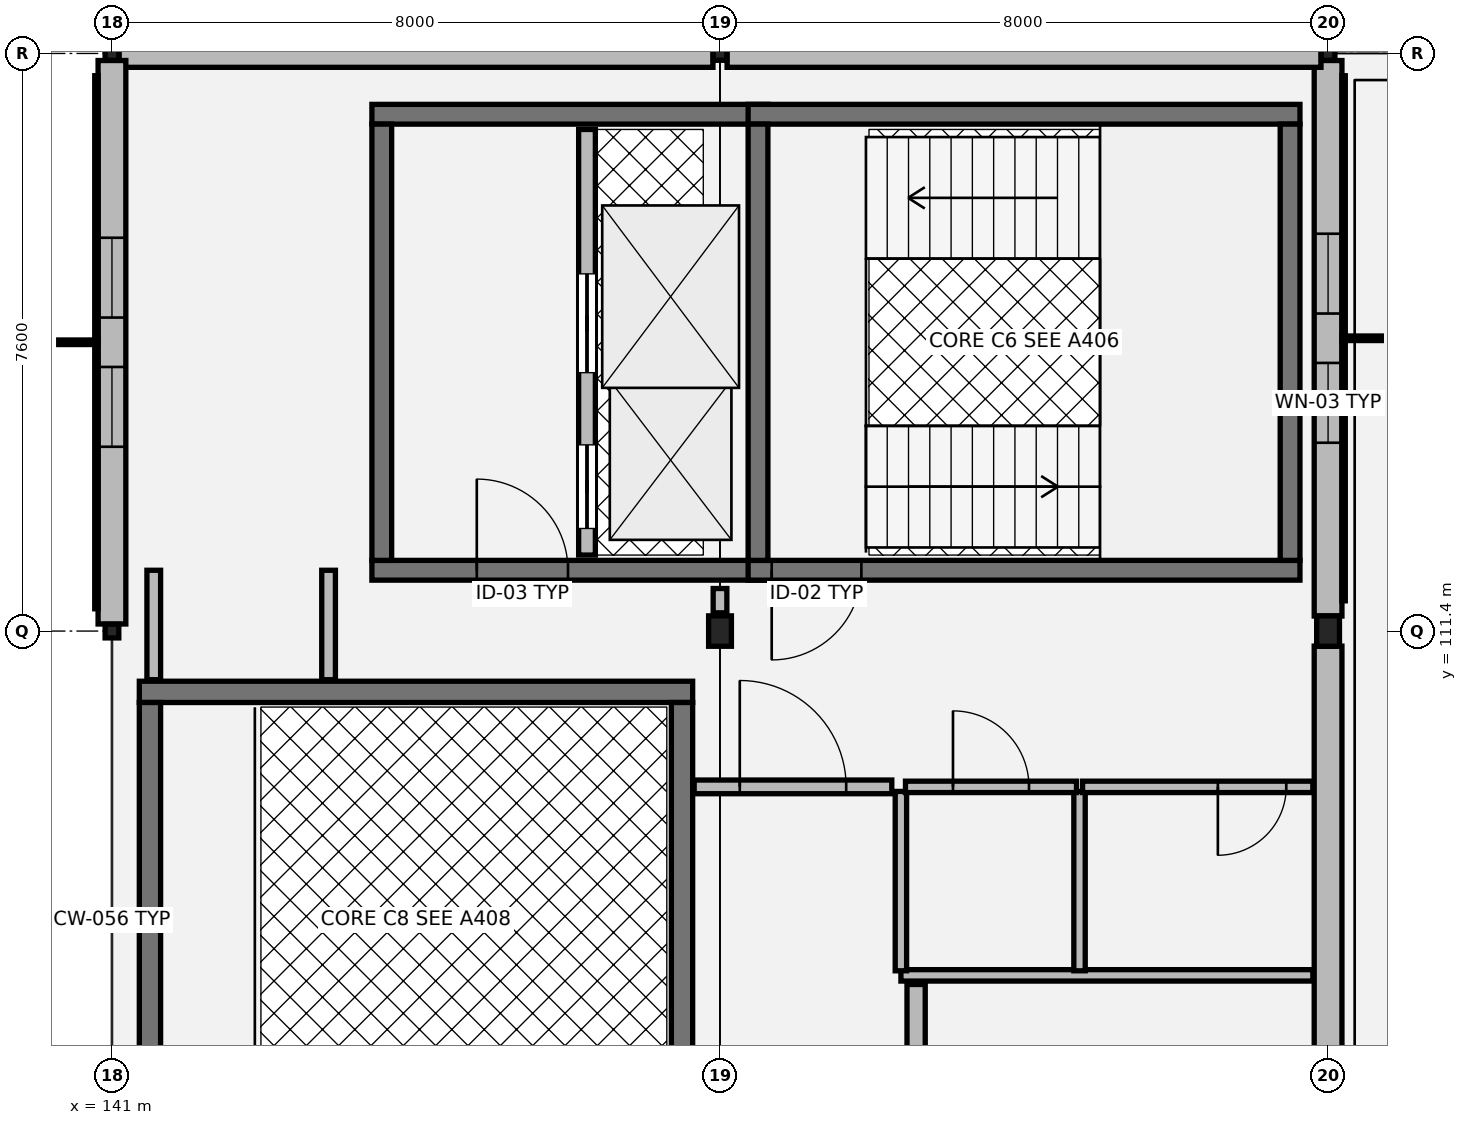
"""IFC4 building model, lengths in metres.
Left out: names, types, materials, properties, quantities, classifications, styles, units other than length and angle.
Written with IfcOpenShell. Run it as: python <this file> out.ifc"""

import sys

from ifc_helpers import new_model, si_unit, direction, frame, frame_2d, origin, origin_2d, place, context, subcontext, project, spatial, rectangle, hollow_rectangle, i_section, extrude, element, fill, save


model = new_model("IFC4")
c1 = context("Model", 3, precision=1e-05, world=origin(), true_north=direction((0.0, 1.0)))
c2 = subcontext(c1, "Body", "Model", "MODEL_VIEW")
j1 = project(units=[si_unit("LENGTHUNIT", "METRE"), si_unit("PLANEANGLEUNIT", "RADIAN")], contexts=[c1])
p1 = place(None, origin())
s1 = spatial("IfcSite", under=j1, at=p1, CompositionType="ELEMENT")
p2 = place(p1, origin())
s2 = spatial("IfcBuilding", under=s1, at=p2, CompositionType="ELEMENT")
p3 = place(p2, frame((0.0, 0.0, 17.34)))
s3 = spatial("IfcBuildingStorey", under=s2, at=p3, CompositionType="ELEMENT", Elevation=17.34)
for number, where, z_axis, x_axis in (
    (1, (141.0, 111.4, 0.0), (0.0, 0.0, 1.0), (1.0, 0.0, 0.0)),
    (2, (141.0, 119.0, 0.0), (0.0, 0.0, 1.0), (1.0, 0.0, 0.0)),
):
    element("IfcColumn", number, at=place(p3, frame(where, z_axis=z_axis, x_axis=x_axis)), inside=s3, PredefinedType="COLUMN", context=c2, shape_type="SweptSolid", body=[
        extrude(hollow_rectangle(XDim=0.18, YDim=0.18, WallThickness=0.01, at=origin_2d()), origin(), (0.0, 0.0, 1.0), 4.055),
    ])
p4 = place(p3, frame((149.0, 111.4, 0.0), z_axis=(0.0, 0.0, 1.0), x_axis=(1.0, 0.0, 0.0)))
e3 = element("IfcColumn", 3, at=p4, inside=s3, PredefinedType="COLUMN", context=c2, shape_type="SweptSolid", body=[
    extrude(i_section(OverallWidth=0.3, OverallDepth=0.4, WebThickness=0.013, FlangeThickness=0.024, at=origin_2d()), origin(), (0.0, 0.0, 1.0), 4.055),
])
p5 = place(p3, frame((149.0, 119.0, 0.0), z_axis=(0.0, 0.0, 1.0), x_axis=(1.0, 0.0, 0.0)))
e4 = element("IfcColumn", 4, at=p5, inside=s3, PredefinedType="COLUMN", context=c2, shape_type="SweptSolid", body=[
    extrude(hollow_rectangle(XDim=0.18, YDim=0.18, WallThickness=0.01, at=origin_2d()), origin(), (0.0, 0.0, 1.0), 4.055),
])
p6 = place(p3, frame((157.0, 111.4, 0.0), z_axis=(0.0, 0.0, 1.0), x_axis=(1.0, 0.0, 0.0)))
e5 = element("IfcColumn", 5, at=p6, inside=s3, PredefinedType="COLUMN", context=c2, shape_type="SweptSolid", body=[
    extrude(i_section(OverallWidth=0.3, OverallDepth=0.4, WebThickness=0.013, FlangeThickness=0.024, at=origin_2d()), origin(), (0.0, 0.0, 1.0), 4.055),
])
p7 = place(p3, frame((157.0, 119.0, 0.0), z_axis=(0.0, 0.0, 1.0), x_axis=(1.0, 0.0, 0.0)))
e6 = element("IfcColumn", 6, at=p7, inside=s3, PredefinedType="COLUMN", context=c2, shape_type="SweptSolid", body=[
    extrude(hollow_rectangle(XDim=0.18, YDim=0.18, WallThickness=0.01, at=origin_2d()), origin(), (0.0, 0.0, 1.0), 4.055),
])
p8 = place(p3, frame((157.0, 103.998, 0.0), z_axis=(0.0, 0.0, 1.0), x_axis=(0.0, 1.0, 0.0)))
e7 = element("IfcWall", 7, at=p8, inside=s3, PredefinedType="SOLIDWALL", context=c2, shape_type="SweptSolid", body=[
    extrude(rectangle(XDim=7.204, YDim=0.365, at=frame_2d((3.602, 0.0))), origin(), (0.0, 0.0, 1.0), 3.22),
])
p9 = place(p3, frame((157.0, 111.598, 0.0), z_axis=(0.0, 0.0, 1.0), x_axis=(0.0, 1.0, 0.0)))
e8 = element("IfcWall", 8, at=p9, inside=s3, PredefinedType="SOLIDWALL", context=c2, shape_type="SweptSolid", body=[
    extrude(rectangle(XDim=7.309, YDim=0.365, at=frame_2d((3.655, 0.0))), origin(), (0.0, 0.0, 1.0), 3.22),
])
p10 = place(p9, frame((2.28, 0.0, 0.8)))
e9 = element("IfcOpeningElement", 9, at=p10, cuts=e8, PredefinedType="OPENING", context=c2, shape_type="SweptSolid", body=[
    extrude(rectangle(XDim=1.05, YDim=2.05, at=frame_2d((0.525, 1.025))), frame((0.0, 0.192, 0.0), z_axis=(0.0, -1.0, 0.0), x_axis=(1.0, 0.0, 0.0)), (0.0, 0.0, 1.0), 0.385),
])
p11 = place(p9, frame((3.98, 0.0, 0.8)))
e10 = element("IfcOpeningElement", 10, at=p11, cuts=e8, PredefinedType="OPENING", context=c2, shape_type="SweptSolid", body=[
    extrude(rectangle(XDim=1.05, YDim=2.05, at=frame_2d((0.525, 1.025))), frame((0.0, 0.192, 0.0), z_axis=(0.0, -1.0, 0.0), x_axis=(1.0, 0.0, 0.0)), (0.0, 0.0, 1.0), 0.385),
])
for number, where, z_axis, x_axis in (
    (11, (156.907, 119.0, 0.0), (0.0, 0.0, 1.0), (-1.0, 0.0, 0.0)),
    (12, (148.907, 119.0, 0.0), (0.0, 0.0, 1.0), (-1.0, 0.0, 0.0)),
):
    element("IfcWall", number, at=place(p3, frame(where, z_axis=z_axis, x_axis=x_axis)), inside=s3, PredefinedType="SOLIDWALL", context=c2, shape_type="SweptSolid", body=[
        extrude(rectangle(XDim=7.814, YDim=0.365, at=frame_2d((3.907, 0.0))), origin(), (0.0, 0.0, 1.0), 3.48),
    ])
p12 = place(p3, frame((141.0, 118.907, 0.0), z_axis=(0.0, 0.0, 1.0), x_axis=(0.0, -1.0, 0.0)))
e13 = element("IfcWall", 13, at=p12, inside=s3, PredefinedType="SOLIDWALL", context=c2, shape_type="SweptSolid", body=[
    extrude(rectangle(XDim=7.414, YDim=0.365, at=frame_2d((3.707, 0.0))), origin(), (0.0, 0.0, 1.0), 3.48),
])
p13 = place(p12, frame((2.332, 0.0, 0.8)))
e14 = element("IfcOpeningElement", 14, at=p13, cuts=e13, PredefinedType="OPENING", context=c2, shape_type="SweptSolid", body=[
    extrude(rectangle(XDim=1.05, YDim=2.05, at=frame_2d((0.525, 1.025))), frame((0.0, 0.192, 0.0), z_axis=(0.0, -1.0, 0.0), x_axis=(1.0, 0.0, 0.0)), (0.0, 0.0, 1.0), 0.385),
])
p14 = place(p12, frame((4.032, 0.0, 0.8)))
e15 = element("IfcOpeningElement", 15, at=p14, cuts=e13, PredefinedType="OPENING", context=c2, shape_type="SweptSolid", body=[
    extrude(rectangle(XDim=1.05, YDim=2.05, at=frame_2d((0.525, 1.025))), frame((0.0, 0.192, 0.0), z_axis=(0.0, -1.0, 0.0), x_axis=(1.0, 0.0, 0.0)), (0.0, 0.0, 1.0), 0.385),
])
p15 = place(p3, frame((144.42, 112.2, 0.0), z_axis=(0.0, 0.0, 1.0), x_axis=(1.0, 0.0, 0.0)))
e16 = element("IfcWall", 16, at=p15, inside=s3, PredefinedType="SHEAR", context=c2, shape_type="SweptSolid", body=[
    extrude(rectangle(XDim=5.21, YDim=0.26, at=frame_2d((2.605, 0.0))), origin(), (0.0, 0.0, 1.0), 3.845),
])
p16 = place(p15, frame((1.38, 0.0, 0.0)))
e17 = element("IfcOpeningElement", 17, at=p16, cuts=e16, PredefinedType="OPENING", context=c2, shape_type="SweptSolid", body=[
    extrude(rectangle(XDim=1.2, YDim=2.16, at=frame_2d((0.6, 1.08))), frame((0.0, 0.14, 0.0), z_axis=(0.0, -1.0, 0.0), x_axis=(1.0, 0.0, 0.0)), (0.0, 0.0, 1.0), 0.28),
])
p17 = place(p3, frame((149.63, 118.2, 0.0), z_axis=(0.0, 0.0, 1.0), x_axis=(-1.0, 0.0, 0.0)))
e18 = element("IfcWall", 18, at=p17, inside=s3, PredefinedType="SHEAR", context=c2, shape_type="SweptSolid", body=[
    extrude(rectangle(XDim=5.21, YDim=0.26, at=frame_2d((2.605, 0.0))), origin(), (0.0, 0.0, 1.0), 3.845),
])
p18 = place(p3, frame((144.55, 118.07, 0.0), z_axis=(0.0, 0.0, 1.0), x_axis=(0.0, -1.0, 0.0)))
e19 = element("IfcWall", 19, at=p18, inside=s3, PredefinedType="SHEAR", context=c2, shape_type="SweptSolid", body=[
    extrude(rectangle(XDim=5.74, YDim=0.26, at=frame_2d((2.87, 0.0))), origin(), (0.0, 0.0, 1.0), 3.845),
])
p19 = place(p3, frame((147.25, 112.4, 0.0), z_axis=(0.0, 0.0, 1.0), x_axis=(0.0, 1.0, 0.0)))
e20 = element("IfcWall", 20, at=p19, inside=s3, PredefinedType="SOLIDWALL", context=c2, shape_type="SweptSolid", body=[
    extrude(rectangle(XDim=5.6, YDim=0.22, at=frame_2d((2.8, 0.0))), origin(), (0.0, 0.0, 1.0), 3.845),
])
p20 = place(p19, frame((0.35, 0.0, 0.0)))
e21 = element("IfcOpeningElement", 21, at=p20, cuts=e20, PredefinedType="OPENING", context=c2, shape_type="SweptSolid", body=[
    extrude(rectangle(XDim=1.1, YDim=2.15, at=frame_2d((0.55, 1.075))), frame((0.0, 0.12, 0.0), z_axis=(0.0, -1.0, 0.0), x_axis=(1.0, 0.0, 0.0)), (0.0, 0.0, 1.0), 0.24),
])
p21 = place(p19, frame((2.4, 0.0, 0.0)))
e22 = element("IfcOpeningElement", 22, at=p21, cuts=e20, PredefinedType="OPENING", context=c2, shape_type="SweptSolid", body=[
    extrude(rectangle(XDim=1.3, YDim=2.18, at=frame_2d((0.65, 1.09))), frame((0.0, 0.12, 0.0), z_axis=(0.0, -1.0, 0.0), x_axis=(1.0, 0.0, 0.0)), (0.0, 0.0, 1.0), 0.24),
])
p22 = place(p3, frame((149.37, 112.2, 0.0), z_axis=(0.0, 0.0, 1.0), x_axis=(1.0, 0.0, 0.0)))
e23 = element("IfcWall", 23, at=p22, inside=s3, PredefinedType="SHEAR", context=c2, shape_type="SweptSolid", body=[
    extrude(rectangle(XDim=7.26, YDim=0.26, at=frame_2d((3.63, 0.0))), origin(), (0.0, 0.0, 1.0), 3.845),
])
p23 = place(p22, frame((0.31, 0.0, 0.0)))
e24 = element("IfcOpeningElement", 24, at=p23, cuts=e23, PredefinedType="OPENING", context=c2, shape_type="SweptSolid", body=[
    extrude(rectangle(XDim=1.18, YDim=2.18, at=frame_2d((0.59, 1.09))), frame((0.0, 0.14, 0.0), z_axis=(0.0, -1.0, 0.0), x_axis=(1.0, 0.0, 0.0)), (0.0, 0.0, 1.0), 0.28),
])
p24 = place(p3, frame((149.37, 118.2, 0.0), z_axis=(0.0, 0.0, 1.0), x_axis=(1.0, 0.0, 0.0)))
e25 = element("IfcWall", 25, at=p24, inside=s3, PredefinedType="SHEAR", context=c2, shape_type="SweptSolid", body=[
    extrude(rectangle(XDim=7.26, YDim=0.26, at=frame_2d((3.63, 0.0))), origin(), (0.0, 0.0, 1.0), 3.845),
])
for number, where, z_axis, x_axis in (
    (26, (149.5, 112.33, 0.0), (0.0, 0.0, 1.0), (0.0, 1.0, 0.0)),
    (27, (156.5, 112.33, 0.0), (0.0, 0.0, 1.0), (0.0, 1.0, 0.0)),
):
    element("IfcWall", number, at=place(p3, frame(where, z_axis=z_axis, x_axis=x_axis)), inside=s3, PredefinedType="SHEAR", context=c2, shape_type="SweptSolid", body=[
        extrude(rectangle(XDim=5.74, YDim=0.26, at=frame_2d((2.87, 0.0))), origin(), (0.0, 0.0, 1.0), 3.845),
    ])
p25 = place(p3, frame((141.36, 110.6, 0.0), z_axis=(0.0, 0.0, 1.0), x_axis=(1.0, 0.0, 0.0)))
e28 = element("IfcWall", 28, at=p25, inside=s3, PredefinedType="SHEAR", context=c2, shape_type="SweptSolid", body=[
    extrude(rectangle(XDim=7.28, YDim=0.28, at=frame_2d((3.64, 0.0))), origin(), (0.0, 0.0, 1.0), 3.845),
])
for number, where, z_axis, x_axis in (
    (29, (141.5, 104.74, 0.0), (0.0, 0.0, 1.0), (0.0, 1.0, 0.0)),
    (30, (148.5, 104.74, 0.0), (0.0, 0.0, 1.0), (0.0, 1.0, 0.0)),
):
    element("IfcWall", number, at=place(p3, frame(where, z_axis=z_axis, x_axis=x_axis)), inside=s3, PredefinedType="SHEAR", context=c2, shape_type="SweptSolid", body=[
        extrude(rectangle(XDim=5.72, YDim=0.28, at=frame_2d((2.86, 0.0))), origin(), (0.0, 0.0, 1.0), 3.845),
    ])
p26 = place(p3, frame((151.38, 106.87, 0.0), z_axis=(0.0, 0.0, 1.0), x_axis=(1.0, 0.0, 0.0)))
e31 = element("IfcWall", 31, at=p26, inside=s3, PredefinedType="PARTITIONING", context=c2, shape_type="SweptSolid", body=[
    extrude(rectangle(XDim=5.42, YDim=0.15, at=frame_2d((2.71, 0.0))), origin(), (0.0, 0.0, 1.0), 3.18),
])
for number, where, z_axis, x_axis in (
    (32, (151.38, 106.93, 0.0), (0.0, 0.0, 1.0), (0.0, 1.0, 0.0)),
    (33, (153.73, 106.93, 0.0), (0.0, 0.0, 1.0), (0.0, 1.0, 0.0)),
):
    element("IfcWall", number, at=place(p3, frame(where, z_axis=z_axis, x_axis=x_axis)), inside=s3, PredefinedType="PARTITIONING", context=c2, shape_type="SweptSolid", body=[
        extrude(rectangle(XDim=2.36, YDim=0.15, at=frame_2d((1.18, 0.0))), origin(), (0.0, 0.0, 1.0), 3.18),
    ])
p27 = place(p3, frame((151.44, 109.35, 0.0), z_axis=(0.0, 0.0, 1.0), x_axis=(1.0, 0.0, 0.0)))
e34 = element("IfcWall", 34, at=p27, inside=s3, PredefinedType="PARTITIONING", context=c2, shape_type="SweptSolid", body=[
    extrude(rectangle(XDim=2.25, YDim=0.15, at=frame_2d((1.125, 0.0))), origin(), (0.0, 0.0, 1.0), 3.18),
])
p28 = place(p27, frame((0.625, 0.0, 0.0)))
e35 = element("IfcOpeningElement", 35, at=p28, cuts=e34, PredefinedType="OPENING", context=c2, shape_type="SweptSolid", body=[
    extrude(rectangle(XDim=1.0, YDim=2.15, at=frame_2d((0.5, 1.075))), frame((0.0, 0.085, 0.0), z_axis=(0.0, -1.0, 0.0), x_axis=(1.0, 0.0, 0.0)), (0.0, 0.0, 1.0), 0.17),
])
p29 = place(p3, frame((153.77, 109.35, 0.0), z_axis=(0.0, 0.0, 1.0), x_axis=(1.0, 0.0, 0.0)))
e36 = element("IfcWall", 36, at=p29, inside=s3, PredefinedType="PARTITIONING", context=c2, shape_type="SweptSolid", body=[
    extrude(rectangle(XDim=3.03, YDim=0.15, at=frame_2d((1.515, 0.0))), origin(), (0.0, 0.0, 1.0), 3.18),
])
p30 = place(p29, frame((1.78, 0.0, 0.0)))
e37 = element("IfcOpeningElement", 37, at=p30, cuts=e36, PredefinedType="OPENING", context=c2, shape_type="SweptSolid", body=[
    extrude(rectangle(XDim=0.9, YDim=2.15, at=frame_2d((0.45, 1.075))), frame((0.0, 0.085, 0.0), z_axis=(0.0, -1.0, 0.0), x_axis=(1.0, 0.0, 0.0)), (0.0, 0.0, 1.0), 0.17),
])
p31 = place(p3, frame((148.66, 109.35, 0.0), z_axis=(0.0, 0.0, 1.0), x_axis=(1.0, 0.0, 0.0)))
e38 = element("IfcWall", 38, at=p31, inside=s3, PredefinedType="PARTITIONING", context=c2, shape_type="SweptSolid", body=[
    extrude(rectangle(XDim=2.6, YDim=0.18, at=frame_2d((1.3, 0.0))), origin(), (0.0, 0.0, 1.0), 3.18),
])
p32 = place(p31, frame((0.6, 0.0, 0.0)))
e39 = element("IfcOpeningElement", 39, at=p32, cuts=e38, PredefinedType="OPENING", context=c2, shape_type="SweptSolid", body=[
    extrude(rectangle(XDim=1.4, YDim=2.22, at=frame_2d((0.7, 1.11))), frame((0.0, 0.1, 0.0), z_axis=(0.0, -1.0, 0.0), x_axis=(1.0, 0.0, 0.0)), (0.0, 0.0, 1.0), 0.2),
])
p33 = place(p3, frame((149.0, 111.64, 0.0), z_axis=(0.0, 0.0, 1.0), x_axis=(0.0, 1.0, 0.0)))
e40 = element("IfcWall", 40, at=p33, inside=s3, PredefinedType="PARTITIONING", context=c2, shape_type="SweptSolid", body=[
    extrude(rectangle(XDim=0.32, YDim=0.18, at=frame_2d((0.16, 0.0))), origin(), (0.0, 0.0, 1.0), 3.18),
])
for number, where, z_axis, x_axis in (
    (41, (141.55, 110.76, 0.0), (0.0, 0.0, 1.0), (0.0, 1.0, 0.0)),
    (42, (143.85, 110.76, 0.0), (0.0, 0.0, 1.0), (0.0, 1.0, 0.0)),
):
    element("IfcWall", number, at=place(p3, frame(where, z_axis=z_axis, x_axis=x_axis)), inside=s3, PredefinedType="PARTITIONING", context=c2, shape_type="SweptSolid", body=[
        extrude(rectangle(XDim=1.44, YDim=0.18, at=frame_2d((0.72, 0.0))), origin(), (0.0, 0.0, 1.0), 3.18),
    ])
p34 = place(p3, frame((151.58, 96.4, 0.0), z_axis=(0.0, 0.0, 1.0), x_axis=(0.0, 1.0, 0.0)))
e43 = element("IfcWall", 43, at=p34, inside=s3, PredefinedType="SOLIDWALL", context=c2, shape_type="SweptSolid", body=[
    extrude(rectangle(XDim=10.35, YDim=0.24, at=frame_2d((5.175, 0.0))), origin(), (0.0, 0.0, 1.0), 3.18),
])
p35 = place(p34, frame((4.525, 0.0, 0.0)))
e44 = element("IfcOpeningElement", 44, at=p35, cuts=e43, PredefinedType="OPENING", context=c2, shape_type="SweptSolid", body=[
    extrude(rectangle(XDim=1.3, YDim=2.2, at=frame_2d((0.65, 1.1))), frame((0.0, 0.13, 0.0), z_axis=(0.0, -1.0, 0.0), x_axis=(1.0, 0.0, 0.0)), (0.0, 0.0, 1.0), 0.26),
])
p36 = place(p10, origin())
e45 = element("IfcWindow", 45, at=p36, inside=s3, PartitioningType="SINGLE_PANEL", PredefinedType="WINDOW", context=c2, shape_type="SweptSolid", body=[
    extrude(rectangle(XDim=1.05, YDim=2.05, at=frame_2d((0.525, 1.025))), frame((0.0, 0.03, 0.0), z_axis=(0.0, -1.0, 0.0), x_axis=(1.0, 0.0, 0.0)), (0.0, 0.0, 1.0), 0.06),
])
fill(e9, e45)
p37 = place(p11, origin())
e46 = element("IfcWindow", 46, at=p37, inside=s3, PartitioningType="SINGLE_PANEL", PredefinedType="WINDOW", context=c2, shape_type="SweptSolid", body=[
    extrude(rectangle(XDim=1.05, YDim=2.05, at=frame_2d((0.525, 1.025))), frame((0.0, 0.03, 0.0), z_axis=(0.0, -1.0, 0.0), x_axis=(1.0, 0.0, 0.0)), (0.0, 0.0, 1.0), 0.06),
])
fill(e10, e46)
p38 = place(p13, origin())
e47 = element("IfcWindow", 47, at=p38, inside=s3, PartitioningType="SINGLE_PANEL", PredefinedType="WINDOW", context=c2, shape_type="SweptSolid", body=[
    extrude(rectangle(XDim=1.05, YDim=2.05, at=frame_2d((0.525, 1.025))), frame((0.0, 0.03, 0.0), z_axis=(0.0, -1.0, 0.0), x_axis=(1.0, 0.0, 0.0)), (0.0, 0.0, 1.0), 0.06),
])
fill(e14, e47)
p39 = place(p14, origin())
e48 = element("IfcWindow", 48, at=p39, inside=s3, PartitioningType="SINGLE_PANEL", PredefinedType="WINDOW", context=c2, shape_type="SweptSolid", body=[
    extrude(rectangle(XDim=1.05, YDim=2.05, at=frame_2d((0.525, 1.025))), frame((0.0, 0.03, 0.0), z_axis=(0.0, -1.0, 0.0), x_axis=(1.0, 0.0, 0.0)), (0.0, 0.0, 1.0), 0.06),
])
fill(e15, e48)
p40 = place(p16, origin())
e49 = element("IfcDoor", 49, at=p40, inside=s3, OperationType="SINGLE_SWING_LEFT", PredefinedType="DOOR", context=c2, shape_type="SweptSolid", body=[
    extrude(rectangle(XDim=1.2, YDim=2.16, at=frame_2d((0.6, 1.08))), frame((0.0, 0.025, 0.0), z_axis=(0.0, -1.0, 0.0), x_axis=(1.0, 0.0, 0.0)), (0.0, 0.0, 1.0), 0.05),
])
fill(e17, e49)
p41 = place(p20, origin())
e50 = element("IfcDoor", 50, at=p41, inside=s3, OperationType="SLIDING_TO_LEFT", PredefinedType="DOOR", context=c2, shape_type="SweptSolid", body=[
    extrude(rectangle(XDim=1.1, YDim=2.15, at=frame_2d((0.55, 1.075))), frame((0.0, 0.025, 0.0), z_axis=(0.0, -1.0, 0.0), x_axis=(1.0, 0.0, 0.0)), (0.0, 0.0, 1.0), 0.05),
])
fill(e21, e50)
p42 = place(p21, origin())
e51 = element("IfcDoor", 51, at=p42, inside=s3, OperationType="SLIDING_TO_LEFT", PredefinedType="DOOR", context=c2, shape_type="SweptSolid", body=[
    extrude(rectangle(XDim=1.3, YDim=2.18, at=frame_2d((0.65, 1.09))), frame((0.0, 0.025, 0.0), z_axis=(0.0, -1.0, 0.0), x_axis=(1.0, 0.0, 0.0)), (0.0, 0.0, 1.0), 0.05),
])
fill(e22, e51)
p43 = place(p23, origin())
e52 = element("IfcDoor", 52, at=p43, inside=s3, OperationType="SINGLE_SWING_RIGHT", PredefinedType="DOOR", context=c2, shape_type="SweptSolid", body=[
    extrude(rectangle(XDim=1.18, YDim=2.18, at=frame_2d((0.59, 1.09))), frame((0.0, 0.025, 0.0), z_axis=(0.0, -1.0, 0.0), x_axis=(1.0, 0.0, 0.0)), (0.0, 0.0, 1.0), 0.05),
])
fill(e24, e52)
p44 = place(p28, origin())
e53 = element("IfcDoor", 53, at=p44, inside=s3, OperationType="SINGLE_SWING_LEFT", PredefinedType="DOOR", context=c2, shape_type="SweptSolid", body=[
    extrude(rectangle(XDim=1.0, YDim=2.15, at=frame_2d((0.5, 1.075))), frame((0.0, 0.025, 0.0), z_axis=(0.0, -1.0, 0.0), x_axis=(1.0, 0.0, 0.0)), (0.0, 0.0, 1.0), 0.05),
])
fill(e35, e53)
p45 = place(p30, origin())
e54 = element("IfcDoor", 54, at=p45, inside=s3, OperationType="SINGLE_SWING_RIGHT", PredefinedType="DOOR", context=c2, shape_type="SweptSolid", body=[
    extrude(rectangle(XDim=0.9, YDim=2.15, at=frame_2d((0.45, 1.075))), frame((0.0, 0.025, 0.0), z_axis=(0.0, -1.0, 0.0), x_axis=(1.0, 0.0, 0.0)), (0.0, 0.0, 1.0), 0.05),
])
fill(e37, e54)
p46 = place(p32, origin())
e55 = element("IfcDoor", 55, at=p46, inside=s3, OperationType="SINGLE_SWING_LEFT", PredefinedType="DOOR", context=c2, shape_type="SweptSolid", body=[
    extrude(rectangle(XDim=1.4, YDim=2.22, at=frame_2d((0.7, 1.11))), frame((0.0, 0.025, 0.0), z_axis=(0.0, -1.0, 0.0), x_axis=(1.0, 0.0, 0.0)), (0.0, 0.0, 1.0), 0.05),
])
fill(e39, e55)
save(model, sys.argv[1])
